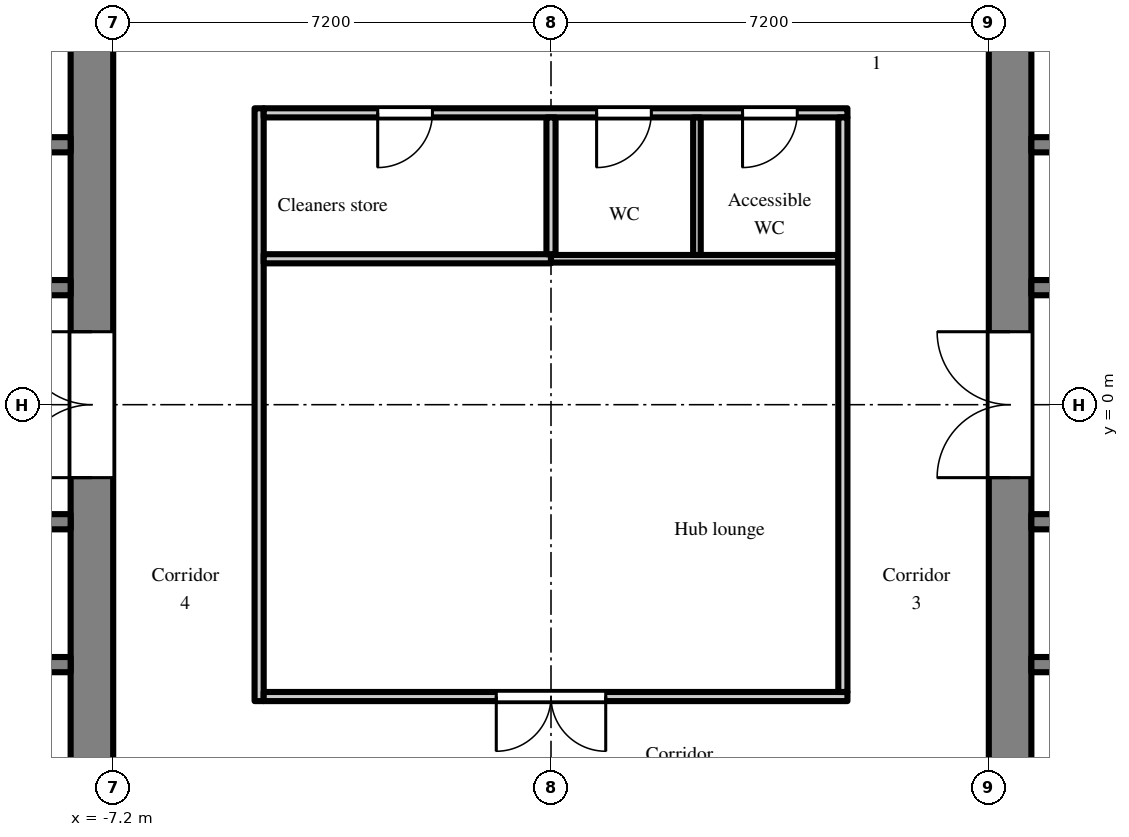
"""IFC4 building model, lengths in metres.
Left out: names, types, materials, properties, quantities, classifications, styles, units other than length and angle.
Written with IfcOpenShell. Run it as: python <this file> out.ifc"""

import sys

from ifc_helpers import new_model, si_unit, direction, frame, frame_2d, origin, place, context, subcontext, project, spatial, rectangle, extrude, element, fill, save


model = new_model("IFC4")
c1 = context("Model", 3, precision=1e-05, world=origin(), true_north=direction((0.0, 1.0)))
c2 = subcontext(c1, "Body", "Model", "MODEL_VIEW")
j1 = project(units=[si_unit("LENGTHUNIT", "METRE"), si_unit("PLANEANGLEUNIT", "RADIAN")], contexts=[c1])
p1 = place(None, origin())
s1 = spatial("IfcSite", under=j1, at=p1, CompositionType="ELEMENT")
p2 = place(p1, origin())
s2 = spatial("IfcBuilding", under=s1, at=p2, CompositionType="ELEMENT")
p3 = place(p2, frame((0.0, 0.0, 138.3)))
s3 = spatial("IfcBuildingStorey", under=s2, at=p3, CompositionType="ELEMENT", Elevation=138.3)
p4 = place(p3, frame((7.55, -7.2, 0.0), z_axis=(0.0, 0.0, 1.0), x_axis=(0.0, 1.0, 0.0)))
e1 = element("IfcWall", 1, at=p4, inside=s3, PredefinedType="SHEAR", context=c2, shape_type="SweptSolid", body=[
    extrude(rectangle(XDim=14.4, YDim=0.7, at=frame_2d((7.2, 0.0))), origin(), (0.0, 0.0, 1.0), 2.6),
])
p5 = place(p4, frame((6.0, 0.0, 0.0)))
e2 = element("IfcOpeningElement", 2, at=p5, cuts=e1, PredefinedType="OPENING", context=c2, shape_type="SweptSolid", body=[
    extrude(rectangle(XDim=2.4, YDim=2.2, at=frame_2d((1.2, 1.1))), frame((0.0, 0.36, 0.0), z_axis=(0.0, -1.0, 0.0), x_axis=(1.0, 0.0, 0.0)), (0.0, 0.0, 1.0), 0.72),
])
p6 = place(p3, frame((7.9, 1.925, 0.0), z_axis=(0.0, 0.0, 1.0), x_axis=(1.0, 0.0, 0.0)))
e3 = element("IfcWall", 3, at=p6, inside=s3, PredefinedType="SHEAR", context=c2, shape_type="SweptSolid", body=[
    extrude(rectangle(XDim=12.95, YDim=0.25, at=frame_2d((6.475, 0.0))), origin(), (0.0, 0.0, 1.0), 2.6),
])
p7 = place(p6, frame((4.825, 0.0, 0.0)))
e4 = element("IfcOpeningElement", 4, at=p7, cuts=e3, PredefinedType="OPENING", context=c2, shape_type="SweptSolid", body=[
    extrude(rectangle(XDim=1.1, YDim=2.1, at=frame_2d((0.55, 1.05))), frame((0.0, 0.135, 0.0), z_axis=(0.0, -1.0, 0.0), x_axis=(1.0, 0.0, 0.0)), (0.0, 0.0, 1.0), 0.27),
])
p8 = place(p6, frame((7.025, 0.0, 0.0)))
e5 = element("IfcOpeningElement", 5, at=p8, cuts=e3, PredefinedType="OPENING", context=c2, shape_type="SweptSolid", body=[
    extrude(rectangle(XDim=1.1, YDim=2.1, at=frame_2d((0.55, 1.05))), frame((0.0, 0.135, 0.0), z_axis=(0.0, -1.0, 0.0), x_axis=(1.0, 0.0, 0.0)), (0.0, 0.0, 1.0), 0.27),
])
p9 = place(p6, frame((9.225, 0.0, 0.0)))
e6 = element("IfcOpeningElement", 6, at=p9, cuts=e3, PredefinedType="OPENING", context=c2, shape_type="SweptSolid", body=[
    extrude(rectangle(XDim=1.1, YDim=2.1, at=frame_2d((0.55, 1.05))), frame((0.0, 0.135, 0.0), z_axis=(0.0, -1.0, 0.0), x_axis=(1.0, 0.0, 0.0)), (0.0, 0.0, 1.0), 0.27),
])
p10 = place(p6, frame((0.525, 0.0, 0.0)))
e7 = element("IfcOpeningElement", 7, at=p10, cuts=e3, PredefinedType="OPENING", context=c2, shape_type="SweptSolid", body=[
    extrude(rectangle(XDim=0.9, YDim=2.1, at=frame_2d((0.45, 1.05))), frame((0.0, 0.135, 0.0), z_axis=(0.0, -1.0, 0.0), x_axis=(1.0, 0.0, 0.0)), (0.0, 0.0, 1.0), 0.27),
])
p11 = place(p6, frame((2.625, 0.0, 0.0)))
e8 = element("IfcOpeningElement", 8, at=p11, cuts=e3, PredefinedType="OPENING", context=c2, shape_type="SweptSolid", body=[
    extrude(rectangle(XDim=1.1, YDim=2.1, at=frame_2d((0.55, 1.05))), frame((0.0, 0.135, 0.0), z_axis=(0.0, -1.0, 0.0), x_axis=(1.0, 0.0, 0.0)), (0.0, 0.0, 1.0), 0.27),
])
p12 = place(p6, frame((11.525, 0.0, 0.0)))
e9 = element("IfcOpeningElement", 9, at=p12, cuts=e3, PredefinedType="OPENING", context=c2, shape_type="SweptSolid", body=[
    extrude(rectangle(XDim=0.9, YDim=2.1, at=frame_2d((0.45, 1.05))), frame((0.0, 0.135, 0.0), z_axis=(0.0, -1.0, 0.0), x_axis=(1.0, 0.0, 0.0)), (0.0, 0.0, 1.0), 0.27),
])
p13 = place(p3, frame((7.9, 4.275, 0.0), z_axis=(0.0, 0.0, 1.0), x_axis=(1.0, 0.0, 0.0)))
e10 = element("IfcWall", 10, at=p13, inside=s3, PredefinedType="SHEAR", context=c2, shape_type="SweptSolid", body=[
    extrude(rectangle(XDim=1.95, YDim=0.25, at=frame_2d((0.975, 0.0))), origin(), (0.0, 0.0, 1.0), 2.6),
])
p14 = place(p3, frame((7.9, -1.925, 0.0), z_axis=(0.0, 0.0, 1.0), x_axis=(1.0, 0.0, 0.0)))
e11 = element("IfcWall", 11, at=p14, inside=s3, PredefinedType="SHEAR", context=c2, shape_type="SweptSolid", body=[
    extrude(rectangle(XDim=12.95, YDim=0.25, at=frame_2d((6.475, 0.0))), origin(), (0.0, 0.0, 1.0), 2.6),
])
p15 = place(p14, frame((0.525, 0.0, 0.0)))
e12 = element("IfcOpeningElement", 12, at=p15, cuts=e11, PredefinedType="OPENING", context=c2, shape_type="SweptSolid", body=[
    extrude(rectangle(XDim=0.9, YDim=2.1, at=frame_2d((0.45, 1.05))), frame((0.0, 0.135, 0.0), z_axis=(0.0, -1.0, 0.0), x_axis=(1.0, 0.0, 0.0)), (0.0, 0.0, 1.0), 0.27),
])
p16 = place(p14, frame((2.625, 0.0, 0.0)))
e13 = element("IfcOpeningElement", 13, at=p16, cuts=e11, PredefinedType="OPENING", context=c2, shape_type="SweptSolid", body=[
    extrude(rectangle(XDim=1.1, YDim=2.1, at=frame_2d((0.55, 1.05))), frame((0.0, 0.135, 0.0), z_axis=(0.0, -1.0, 0.0), x_axis=(1.0, 0.0, 0.0)), (0.0, 0.0, 1.0), 0.27),
])
p17 = place(p14, frame((6.025, 0.0, 0.0)))
e14 = element("IfcOpeningElement", 14, at=p17, cuts=e11, PredefinedType="OPENING", context=c2, shape_type="SweptSolid", body=[
    extrude(rectangle(XDim=0.9, YDim=2.1, at=frame_2d((0.45, 1.05))), frame((0.0, 0.135, 0.0), z_axis=(0.0, -1.0, 0.0), x_axis=(1.0, 0.0, 0.0)), (0.0, 0.0, 1.0), 0.27),
])
p18 = place(p14, frame((10.425, 0.0, 0.0)))
e15 = element("IfcOpeningElement", 15, at=p18, cuts=e11, PredefinedType="OPENING", context=c2, shape_type="SweptSolid", body=[
    extrude(rectangle(XDim=0.9, YDim=2.1, at=frame_2d((0.45, 1.05))), frame((0.0, 0.135, 0.0), z_axis=(0.0, -1.0, 0.0), x_axis=(1.0, 0.0, 0.0)), (0.0, 0.0, 1.0), 0.27),
])
p19 = place(p3, frame((7.9, -4.275, 0.0), z_axis=(0.0, 0.0, 1.0), x_axis=(1.0, 0.0, 0.0)))
e16 = element("IfcWall", 16, at=p19, inside=s3, PredefinedType="SHEAR", context=c2, shape_type="SweptSolid", body=[
    extrude(rectangle(XDim=1.95, YDim=0.25, at=frame_2d((0.975, 0.0))), origin(), (0.0, 0.0, 1.0), 2.6),
])
p20 = place(p3, frame((-7.55, -7.2, 0.0), z_axis=(0.0, 0.0, 1.0), x_axis=(0.0, 1.0, 0.0)))
e17 = element("IfcWall", 17, at=p20, inside=s3, PredefinedType="SHEAR", context=c2, shape_type="SweptSolid", body=[
    extrude(rectangle(XDim=14.4, YDim=0.7, at=frame_2d((7.2, 0.0))), origin(), (0.0, 0.0, 1.0), 2.6),
])
p21 = place(p20, frame((6.0, 0.0, 0.0)))
e18 = element("IfcOpeningElement", 18, at=p21, cuts=e17, PredefinedType="OPENING", context=c2, shape_type="SweptSolid", body=[
    extrude(rectangle(XDim=2.4, YDim=2.2, at=frame_2d((1.2, 1.1))), frame((0.0, 0.36, 0.0), z_axis=(0.0, -1.0, 0.0), x_axis=(1.0, 0.0, 0.0)), (0.0, 0.0, 1.0), 0.72),
])
p22 = place(p3, frame((-7.9, 1.925, 0.0), z_axis=(0.0, 0.0, 1.0), x_axis=(-1.0, 0.0, 0.0)))
e19 = element("IfcWall", 19, at=p22, inside=s3, PredefinedType="SHEAR", context=c2, shape_type="SweptSolid", body=[
    extrude(rectangle(XDim=12.95, YDim=0.25, at=frame_2d((6.475, 0.0))), origin(), (0.0, 0.0, 1.0), 2.6),
])
p23 = place(p22, frame((4.825, 0.0, 0.0)))
e20 = element("IfcOpeningElement", 20, at=p23, cuts=e19, PredefinedType="OPENING", context=c2, shape_type="SweptSolid", body=[
    extrude(rectangle(XDim=1.1, YDim=2.1, at=frame_2d((0.55, 1.05))), frame((0.0, 0.135, 0.0), z_axis=(0.0, -1.0, 0.0), x_axis=(1.0, 0.0, 0.0)), (0.0, 0.0, 1.0), 0.27),
])
p24 = place(p22, frame((7.025, 0.0, 0.0)))
e21 = element("IfcOpeningElement", 21, at=p24, cuts=e19, PredefinedType="OPENING", context=c2, shape_type="SweptSolid", body=[
    extrude(rectangle(XDim=1.1, YDim=2.1, at=frame_2d((0.55, 1.05))), frame((0.0, 0.135, 0.0), z_axis=(0.0, -1.0, 0.0), x_axis=(1.0, 0.0, 0.0)), (0.0, 0.0, 1.0), 0.27),
])
p25 = place(p22, frame((9.225, 0.0, 0.0)))
e22 = element("IfcOpeningElement", 22, at=p25, cuts=e19, PredefinedType="OPENING", context=c2, shape_type="SweptSolid", body=[
    extrude(rectangle(XDim=1.1, YDim=2.1, at=frame_2d((0.55, 1.05))), frame((0.0, 0.135, 0.0), z_axis=(0.0, -1.0, 0.0), x_axis=(1.0, 0.0, 0.0)), (0.0, 0.0, 1.0), 0.27),
])
p26 = place(p22, frame((0.525, 0.0, 0.0)))
e23 = element("IfcOpeningElement", 23, at=p26, cuts=e19, PredefinedType="OPENING", context=c2, shape_type="SweptSolid", body=[
    extrude(rectangle(XDim=0.9, YDim=2.1, at=frame_2d((0.45, 1.05))), frame((0.0, 0.135, 0.0), z_axis=(0.0, -1.0, 0.0), x_axis=(1.0, 0.0, 0.0)), (0.0, 0.0, 1.0), 0.27),
])
p27 = place(p22, frame((2.625, 0.0, 0.0)))
e24 = element("IfcOpeningElement", 24, at=p27, cuts=e19, PredefinedType="OPENING", context=c2, shape_type="SweptSolid", body=[
    extrude(rectangle(XDim=1.1, YDim=2.1, at=frame_2d((0.55, 1.05))), frame((0.0, 0.135, 0.0), z_axis=(0.0, -1.0, 0.0), x_axis=(1.0, 0.0, 0.0)), (0.0, 0.0, 1.0), 0.27),
])
p28 = place(p22, frame((11.525, 0.0, 0.0)))
e25 = element("IfcOpeningElement", 25, at=p28, cuts=e19, PredefinedType="OPENING", context=c2, shape_type="SweptSolid", body=[
    extrude(rectangle(XDim=0.9, YDim=2.1, at=frame_2d((0.45, 1.05))), frame((0.0, 0.135, 0.0), z_axis=(0.0, -1.0, 0.0), x_axis=(1.0, 0.0, 0.0)), (0.0, 0.0, 1.0), 0.27),
])
p29 = place(p3, frame((-7.9, 4.275, 0.0), z_axis=(0.0, 0.0, 1.0), x_axis=(-1.0, 0.0, 0.0)))
e26 = element("IfcWall", 26, at=p29, inside=s3, PredefinedType="SHEAR", context=c2, shape_type="SweptSolid", body=[
    extrude(rectangle(XDim=1.95, YDim=0.25, at=frame_2d((0.975, 0.0))), origin(), (0.0, 0.0, 1.0), 2.6),
])
p30 = place(p3, frame((-7.9, -1.925, 0.0), z_axis=(0.0, 0.0, 1.0), x_axis=(-1.0, 0.0, 0.0)))
e27 = element("IfcWall", 27, at=p30, inside=s3, PredefinedType="SHEAR", context=c2, shape_type="SweptSolid", body=[
    extrude(rectangle(XDim=12.95, YDim=0.25, at=frame_2d((6.475, 0.0))), origin(), (0.0, 0.0, 1.0), 2.6),
])
p31 = place(p30, frame((0.525, 0.0, 0.0)))
e28 = element("IfcOpeningElement", 28, at=p31, cuts=e27, PredefinedType="OPENING", context=c2, shape_type="SweptSolid", body=[
    extrude(rectangle(XDim=0.9, YDim=2.1, at=frame_2d((0.45, 1.05))), frame((0.0, 0.135, 0.0), z_axis=(0.0, -1.0, 0.0), x_axis=(1.0, 0.0, 0.0)), (0.0, 0.0, 1.0), 0.27),
])
p32 = place(p30, frame((2.625, 0.0, 0.0)))
e29 = element("IfcOpeningElement", 29, at=p32, cuts=e27, PredefinedType="OPENING", context=c2, shape_type="SweptSolid", body=[
    extrude(rectangle(XDim=1.1, YDim=2.1, at=frame_2d((0.55, 1.05))), frame((0.0, 0.135, 0.0), z_axis=(0.0, -1.0, 0.0), x_axis=(1.0, 0.0, 0.0)), (0.0, 0.0, 1.0), 0.27),
])
p33 = place(p30, frame((6.025, 0.0, 0.0)))
e30 = element("IfcOpeningElement", 30, at=p33, cuts=e27, PredefinedType="OPENING", context=c2, shape_type="SweptSolid", body=[
    extrude(rectangle(XDim=0.9, YDim=2.1, at=frame_2d((0.45, 1.05))), frame((0.0, 0.135, 0.0), z_axis=(0.0, -1.0, 0.0), x_axis=(1.0, 0.0, 0.0)), (0.0, 0.0, 1.0), 0.27),
])
p34 = place(p30, frame((10.425, 0.0, 0.0)))
e31 = element("IfcOpeningElement", 31, at=p34, cuts=e27, PredefinedType="OPENING", context=c2, shape_type="SweptSolid", body=[
    extrude(rectangle(XDim=0.9, YDim=2.1, at=frame_2d((0.45, 1.05))), frame((0.0, 0.135, 0.0), z_axis=(0.0, -1.0, 0.0), x_axis=(1.0, 0.0, 0.0)), (0.0, 0.0, 1.0), 0.27),
])
p35 = place(p3, frame((-7.9, -4.275, 0.0), z_axis=(0.0, 0.0, 1.0), x_axis=(-1.0, 0.0, 0.0)))
e32 = element("IfcWall", 32, at=p35, inside=s3, PredefinedType="SHEAR", context=c2, shape_type="SweptSolid", body=[
    extrude(rectangle(XDim=1.95, YDim=0.25, at=frame_2d((0.975, 0.0))), origin(), (0.0, 0.0, 1.0), 2.6),
])
p36 = place(p3, frame((-4.8, -4.875, 0.0), z_axis=(0.0, 0.0, 1.0), x_axis=(0.0, 1.0, 0.0)))
e33 = element("IfcWall", 33, at=p36, inside=s3, PredefinedType="PARTITIONING", context=c2, shape_type="SweptSolid", body=[
    extrude(rectangle(XDim=9.75, YDim=0.15, at=frame_2d((4.875, 0.0))), origin(), (0.0, 0.0, 1.0), 2.6),
])
p37 = place(p3, frame((-4.725, -4.8, 0.0), z_axis=(0.0, 0.0, 1.0), x_axis=(1.0, 0.0, 0.0)))
e34 = element("IfcWall", 34, at=p37, inside=s3, PredefinedType="PARTITIONING", context=c2, shape_type="SweptSolid", body=[
    extrude(rectangle(XDim=9.6, YDim=0.15, at=frame_2d((4.8, 0.0))), origin(), (0.0, 0.0, 1.0), 2.6),
])
p38 = place(p37, frame((3.825, 0.0, 0.0)))
e35 = element("IfcOpeningElement", 35, at=p38, cuts=e34, PredefinedType="OPENING", context=c2, shape_type="SweptSolid", body=[
    extrude(rectangle(XDim=1.8, YDim=2.1, at=frame_2d((0.9, 1.05))), frame((0.0, 0.085, 0.0), z_axis=(0.0, -1.0, 0.0), x_axis=(1.0, 0.0, 0.0)), (0.0, 0.0, 1.0), 0.17),
])
p39 = place(p3, frame((-4.725, 2.4, 0.0), z_axis=(0.0, 0.0, 1.0), x_axis=(1.0, 0.0, 0.0)))
e36 = element("IfcWall", 36, at=p39, inside=s3, PredefinedType="PARTITIONING", context=c2, shape_type="SweptSolid", body=[
    extrude(rectangle(XDim=4.725, YDim=0.15, at=frame_2d((2.363, 0.0))), origin(), (0.0, 0.0, 1.0), 2.6),
])
p40 = place(p3, frame((-4.725, 4.8, 0.0), z_axis=(0.0, 0.0, 1.0), x_axis=(1.0, 0.0, 0.0)))
e37 = element("IfcWall", 37, at=p40, inside=s3, PredefinedType="PARTITIONING", context=c2, shape_type="SweptSolid", body=[
    extrude(rectangle(XDim=9.6, YDim=0.15, at=frame_2d((4.8, 0.0))), origin(), (0.0, 0.0, 1.0), 2.6),
])
p41 = place(p40, frame((7.875, 0.0, 0.0)))
e38 = element("IfcOpeningElement", 38, at=p41, cuts=e37, PredefinedType="OPENING", context=c2, shape_type="SweptSolid", body=[
    extrude(rectangle(XDim=0.9, YDim=2.1, at=frame_2d((0.45, 1.05))), frame((0.0, 0.085, 0.0), z_axis=(0.0, -1.0, 0.0), x_axis=(1.0, 0.0, 0.0)), (0.0, 0.0, 1.0), 0.17),
])
p42 = place(p40, frame((5.475, 0.0, 0.0)))
e39 = element("IfcOpeningElement", 39, at=p42, cuts=e37, PredefinedType="OPENING", context=c2, shape_type="SweptSolid", body=[
    extrude(rectangle(XDim=0.9, YDim=2.1, at=frame_2d((0.45, 1.05))), frame((0.0, 0.085, 0.0), z_axis=(0.0, -1.0, 0.0), x_axis=(1.0, 0.0, 0.0)), (0.0, 0.0, 1.0), 0.17),
])
p43 = place(p40, frame((1.875, 0.0, 0.0)))
e40 = element("IfcOpeningElement", 40, at=p43, cuts=e37, PredefinedType="OPENING", context=c2, shape_type="SweptSolid", body=[
    extrude(rectangle(XDim=0.9, YDim=2.1, at=frame_2d((0.45, 1.05))), frame((0.0, 0.085, 0.0), z_axis=(0.0, -1.0, 0.0), x_axis=(1.0, 0.0, 0.0)), (0.0, 0.0, 1.0), 0.17),
])
p44 = place(p3, frame((0.0, 2.475, 0.0), z_axis=(0.0, 0.0, 1.0), x_axis=(0.0, 1.0, 0.0)))
e41 = element("IfcWall", 41, at=p44, inside=s3, PredefinedType="PARTITIONING", context=c2, shape_type="SweptSolid", body=[
    extrude(rectangle(XDim=2.25, YDim=0.15, at=frame_2d((1.125, 0.0))), origin(), (0.0, 0.0, 1.0), 2.6),
])
p45 = place(p3, frame((0.0, 2.4, 0.0), z_axis=(0.0, 0.0, 1.0), x_axis=(1.0, 0.0, 0.0)))
e42 = element("IfcWall", 42, at=p45, inside=s3, PredefinedType="PARTITIONING", context=c2, shape_type="SweptSolid", body=[
    extrude(rectangle(XDim=4.725, YDim=0.125, at=frame_2d((2.363, 0.0))), origin(), (0.0, 0.0, 1.0), 2.6),
])
p46 = place(p3, frame((2.4, 2.462, 0.0), z_axis=(0.0, 0.0, 1.0), x_axis=(0.0, 1.0, 0.0)))
e43 = element("IfcWall", 43, at=p46, inside=s3, PredefinedType="PARTITIONING", context=c2, shape_type="SweptSolid", body=[
    extrude(rectangle(XDim=2.263, YDim=0.125, at=frame_2d((1.131, 0.0))), origin(), (0.0, 0.0, 1.0), 2.6),
])
p47 = place(p3, frame((4.8, -4.725, 0.0), z_axis=(0.0, 0.0, 1.0), x_axis=(0.0, 1.0, 0.0)))
e44 = element("IfcWall", 44, at=p47, inside=s3, PredefinedType="PARTITIONING", context=c2, shape_type="SweptSolid", body=[
    extrude(rectangle(XDim=9.45, YDim=0.15, at=frame_2d((4.725, 0.0))), origin(), (0.0, 0.0, 1.0), 2.6),
])
p48 = place(p5, origin())
e45 = element("IfcDoor", 45, at=p48, inside=s3, OperationType="DOUBLE_DOOR_DOUBLE_SWING", PredefinedType="DOOR", context=c2, shape_type="SweptSolid", body=[
    extrude(rectangle(XDim=2.4, YDim=2.2, at=frame_2d((1.2, 1.1))), frame((0.0, 0.025, 0.0), z_axis=(0.0, -1.0, 0.0), x_axis=(1.0, 0.0, 0.0)), (0.0, 0.0, 1.0), 0.05),
])
fill(e2, e45)
p49 = place(p21, origin())
e46 = element("IfcDoor", 46, at=p49, inside=s3, OperationType="DOUBLE_DOOR_DOUBLE_SWING", PredefinedType="DOOR", context=c2, shape_type="SweptSolid", body=[
    extrude(rectangle(XDim=2.4, YDim=2.2, at=frame_2d((1.2, 1.1))), frame((0.0, 0.025, 0.0), z_axis=(0.0, -1.0, 0.0), x_axis=(1.0, 0.0, 0.0)), (0.0, 0.0, 1.0), 0.05),
])
fill(e18, e46)
p50 = place(p41, frame((0.9, 0.0, 0.0), z_axis=(0.0, 0.0, 1.0), x_axis=(-1.0, 0.0, 0.0)))
e47 = element("IfcDoor", 47, at=p50, inside=s3, OperationType="SINGLE_SWING_RIGHT", PredefinedType="DOOR", context=c2, shape_type="SweptSolid", body=[
    extrude(rectangle(XDim=0.9, YDim=2.1, at=frame_2d((0.45, 1.05))), frame((0.0, 0.025, 0.0), z_axis=(0.0, -1.0, 0.0), x_axis=(1.0, 0.0, 0.0)), (0.0, 0.0, 1.0), 0.05),
])
fill(e38, e47)
p51 = place(p42, frame((0.9, 0.0, 0.0), z_axis=(0.0, 0.0, 1.0), x_axis=(-1.0, 0.0, 0.0)))
e48 = element("IfcDoor", 48, at=p51, inside=s3, OperationType="SINGLE_SWING_RIGHT", PredefinedType="DOOR", context=c2, shape_type="SweptSolid", body=[
    extrude(rectangle(XDim=0.9, YDim=2.1, at=frame_2d((0.45, 1.05))), frame((0.0, 0.025, 0.0), z_axis=(0.0, -1.0, 0.0), x_axis=(1.0, 0.0, 0.0)), (0.0, 0.0, 1.0), 0.05),
])
fill(e39, e48)
p52 = place(p43, frame((0.9, 0.0, 0.0), z_axis=(0.0, 0.0, 1.0), x_axis=(-1.0, 0.0, 0.0)))
e49 = element("IfcDoor", 49, at=p52, inside=s3, OperationType="SINGLE_SWING_RIGHT", PredefinedType="DOOR", context=c2, shape_type="SweptSolid", body=[
    extrude(rectangle(XDim=0.9, YDim=2.1, at=frame_2d((0.45, 1.05))), frame((0.0, 0.025, 0.0), z_axis=(0.0, -1.0, 0.0), x_axis=(1.0, 0.0, 0.0)), (0.0, 0.0, 1.0), 0.05),
])
fill(e40, e49)
p53 = place(p38, frame((1.8, 0.0, 0.0), z_axis=(0.0, 0.0, 1.0), x_axis=(-1.0, 0.0, 0.0)))
e50 = element("IfcDoor", 50, at=p53, inside=s3, OperationType="DOUBLE_DOOR_DOUBLE_SWING", PredefinedType="DOOR", context=c2, shape_type="SweptSolid", body=[
    extrude(rectangle(XDim=1.8, YDim=2.1, at=frame_2d((0.9, 1.05))), frame((0.0, 0.025, 0.0), z_axis=(0.0, -1.0, 0.0), x_axis=(1.0, 0.0, 0.0)), (0.0, 0.0, 1.0), 0.05),
])
fill(e35, e50)
save(model, sys.argv[1])
